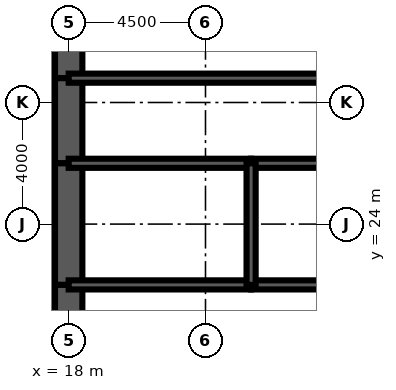
"""IFC4 building model, lengths in metres.
Left out: names, types, materials, properties, quantities, classifications, styles, units other than length and angle.
Written with IfcOpenShell. Run it as: python <this file> out.ifc"""

import sys

from ifc_helpers import new_model, si_unit, direction, frame, frame_2d, origin, place, context, subcontext, project, spatial, rectangle, extrude, element, fill, save


model = new_model("IFC4")
c1 = context("Model", 3, precision=1e-05, world=origin(), true_north=direction((0.0, 1.0)))
c2 = subcontext(c1, "Body", "Model", "MODEL_VIEW")
j1 = project(units=[si_unit("LENGTHUNIT", "METRE"), si_unit("PLANEANGLEUNIT", "RADIAN")], contexts=[c1])
p1 = place(None, origin())
s1 = spatial("IfcSite", under=j1, at=p1, CompositionType="ELEMENT")
p2 = place(p1, origin())
s2 = spatial("IfcBuilding", under=s1, at=p2, CompositionType="ELEMENT")
p3 = place(p2, frame((0.0, 0.0, 176.1)))
s3 = spatial("IfcBuildingStorey", under=s2, at=p3, CompositionType="ELEMENT", Elevation=176.1)
p4 = place(p3, frame((18.0, 32.0, 0.0), z_axis=(0.0, 0.0, 1.0), x_axis=(0.0, -1.0, 0.0)))
e1 = element("IfcWall", 1, at=p4, inside=s3, PredefinedType="SHEAR", context=c2, shape_type="SweptSolid", body=[
    extrude(rectangle(XDim=3.2, YDim=0.9, at=frame_2d((1.6, 0.0))), origin(), (0.0, 0.0, 1.0), 4.2),
])
p5 = place(p3, frame((18.0, 28.8, 0.0), z_axis=(0.0, 0.0, 1.0), x_axis=(0.0, -1.0, 0.0)))
e2 = element("IfcWall", 2, at=p5, inside=s3, PredefinedType="SHEAR", context=c2, shape_type="SweptSolid", body=[
    extrude(rectangle(XDim=2.8, YDim=0.9, at=frame_2d((1.4, 0.0))), origin(), (0.0, 0.0, 1.0), 4.2),
])
p6 = place(p5, frame((0.4, 0.0, 0.0)))
e3 = element("IfcOpeningElement", 3, at=p6, cuts=e2, PredefinedType="OPENING", context=c2, shape_type="SweptSolid", body=[
    extrude(rectangle(XDim=1.8, YDim=2.1, at=frame_2d((0.9, 1.05))), frame((0.0, 0.46, 0.0), z_axis=(0.0, -1.0, 0.0), x_axis=(1.0, 0.0, 0.0)), (0.0, 0.0, 1.0), 0.92),
])
p7 = place(p3, frame((18.0, 26.0, 0.0), z_axis=(0.0, 0.0, 1.0), x_axis=(0.0, -1.0, 0.0)))
e4 = element("IfcWall", 4, at=p7, inside=s3, PredefinedType="SHEAR", context=c2, shape_type="SweptSolid", body=[
    extrude(rectangle(XDim=4.0, YDim=0.9, at=frame_2d((2.0, 0.0))), origin(), (0.0, 0.0, 1.0), 4.2),
])
p8 = place(p3, frame((18.0, 22.0, 0.0), z_axis=(0.0, 0.0, 1.0), x_axis=(0.0, -1.0, 0.0)))
e5 = element("IfcWall", 5, at=p8, inside=s3, PredefinedType="SHEAR", context=c2, shape_type="SweptSolid", body=[
    extrude(rectangle(XDim=2.8, YDim=0.9, at=frame_2d((1.4, 0.0))), origin(), (0.0, 0.0, 1.0), 4.2),
])
p9 = place(p8, frame((0.6, 0.0, 0.0)))
e6 = element("IfcOpeningElement", 6, at=p9, cuts=e5, PredefinedType="OPENING", context=c2, shape_type="SweptSolid", body=[
    extrude(rectangle(XDim=1.8, YDim=2.1, at=frame_2d((0.9, 1.05))), frame((0.0, 0.46, 0.0), z_axis=(0.0, -1.0, 0.0), x_axis=(1.0, 0.0, 0.0)), (0.0, 0.0, 1.0), 0.92),
])
p10 = place(p3, frame((18.0, 28.8, 0.0), z_axis=(0.0, 0.0, 1.0), x_axis=(1.0, 0.0, 0.0)))
e7 = element("IfcWall", 7, at=p10, inside=s3, PredefinedType="SOLIDWALL", context=c2, shape_type="SweptSolid", body=[
    extrude(rectangle(XDim=9.0, YDim=0.3, at=frame_2d((4.5, 0.0))), origin(), (0.0, 0.0, 1.0), 4.2),
])
p11 = place(p10, frame((0.65, 0.0, 0.0)))
e8 = element("IfcOpeningElement", 8, at=p11, cuts=e7, PredefinedType="OPENING", context=c2, shape_type="SweptSolid", body=[
    extrude(rectangle(XDim=1.0, YDim=2.1, at=frame_2d((0.5, 1.05))), frame((0.0, 0.16, 0.0), z_axis=(0.0, -1.0, 0.0), x_axis=(1.0, 0.0, 0.0)), (0.0, 0.0, 1.0), 0.32),
])
p12 = place(p3, frame((18.0, 22.0, 0.0), z_axis=(0.0, 0.0, 1.0), x_axis=(1.0, 0.0, 0.0)))
e9 = element("IfcWall", 9, at=p12, inside=s3, PredefinedType="SOLIDWALL", context=c2, shape_type="SweptSolid", body=[
    extrude(rectangle(XDim=6.0, YDim=0.3, at=frame_2d((3.0, 0.0))), origin(), (0.0, 0.0, 1.0), 4.2),
])
p13 = place(p12, frame((4.4, 0.0, 0.0)))
e10 = element("IfcOpeningElement", 10, at=p13, cuts=e9, PredefinedType="OPENING", context=c2, shape_type="SweptSolid", body=[
    extrude(rectangle(XDim=1.0, YDim=2.1, at=frame_2d((0.5, 1.05))), frame((0.0, 0.16, 0.0), z_axis=(0.0, -1.0, 0.0), x_axis=(1.0, 0.0, 0.0)), (0.0, 0.0, 1.0), 0.32),
])
p14 = place(p12, frame((0.85, 0.0, 0.0)))
e11 = element("IfcOpeningElement", 11, at=p14, cuts=e9, PredefinedType="OPENING", context=c2, shape_type="SweptSolid", body=[
    extrude(rectangle(XDim=1.0, YDim=2.1, at=frame_2d((0.5, 1.05))), frame((0.0, 0.16, 0.0), z_axis=(0.0, -1.0, 0.0), x_axis=(1.0, 0.0, 0.0)), (0.0, 0.0, 1.0), 0.32),
])
p15 = place(p3, frame((24.0, 22.0, 0.0), z_axis=(0.0, 0.0, 1.0), x_axis=(1.0, 0.0, 0.0)))
e12 = element("IfcWall", 12, at=p15, inside=s3, PredefinedType="SOLIDWALL", context=c2, shape_type="SweptSolid", body=[
    extrude(rectangle(XDim=3.0, YDim=0.3, at=frame_2d((1.5, 0.0))), origin(), (0.0, 0.0, 1.0), 4.2),
])
p16 = place(p15, frame((1.0, 0.0, 0.0)))
e13 = element("IfcOpeningElement", 13, at=p16, cuts=e12, PredefinedType="OPENING", context=c2, shape_type="SweptSolid", body=[
    extrude(rectangle(XDim=1.0, YDim=2.1, at=frame_2d((0.5, 1.05))), frame((0.0, 0.16, 0.0), z_axis=(0.0, -1.0, 0.0), x_axis=(1.0, 0.0, 0.0)), (0.0, 0.0, 1.0), 0.32),
])
p17 = place(p3, frame((18.0, 26.0, 0.0), z_axis=(0.0, 0.0, 1.0), x_axis=(1.0, 0.0, 0.0)))
e14 = element("IfcWall", 14, at=p17, inside=s3, PredefinedType="SOLIDWALL", context=c2, shape_type="SweptSolid", body=[
    extrude(rectangle(XDim=6.0, YDim=0.3, at=frame_2d((3.0, 0.0))), origin(), (0.0, 0.0, 1.0), 4.2),
])
p18 = place(p3, frame((24.0, 26.0, 0.0), z_axis=(0.0, 0.0, 1.0), x_axis=(1.0, 0.0, 0.0)))
e15 = element("IfcWall", 15, at=p18, inside=s3, PredefinedType="SOLIDWALL", context=c2, shape_type="SweptSolid", body=[
    extrude(rectangle(XDim=3.0, YDim=0.3, at=frame_2d((1.5, 0.0))), origin(), (0.0, 0.0, 1.0), 4.2),
])
p19 = place(p3, frame((24.0, 22.0, 0.0), z_axis=(0.0, 0.0, 1.0), x_axis=(0.0, 1.0, 0.0)))
e16 = element("IfcWall", 16, at=p19, inside=s3, PredefinedType="SOLIDWALL", context=c2, shape_type="SweptSolid", body=[
    extrude(rectangle(XDim=4.0, YDim=0.3, at=frame_2d((2.0, 0.0))), origin(), (0.0, 0.0, 1.0), 4.2),
])
p20 = place(p3, frame((20.325, 22.15, 0.0), z_axis=(0.0, 0.0, 1.0), x_axis=(0.0, 1.0, 0.0)))
e17 = element("IfcWall", 17, at=p20, inside=s3, PredefinedType="PARTITIONING", context=c2, shape_type="SweptSolid", body=[
    extrude(rectangle(XDim=3.7, YDim=0.15, at=frame_2d((1.85, 0.0))), origin(), (0.0, 0.0, 1.0), 3.0),
])
p21 = place(p3, frame((25.2, 26.15, 0.0), z_axis=(0.0, 0.0, 1.0), x_axis=(0.0, 1.0, 0.0)))
e18 = element("IfcWall", 18, at=p21, inside=s3, PredefinedType="PARTITIONING", context=c2, shape_type="SweptSolid", body=[
    extrude(rectangle(XDim=2.5, YDim=0.15, at=frame_2d((1.25, 0.0))), origin(), (0.0, 0.0, 1.0), 3.0),
])
p22 = place(p21, frame((0.35, 0.0, 0.0)))
e19 = element("IfcOpeningElement", 19, at=p22, cuts=e18, PredefinedType="OPENING", context=c2, shape_type="SweptSolid", body=[
    extrude(rectangle(XDim=1.0, YDim=2.1, at=frame_2d((0.5, 1.05))), frame((0.0, 0.085, 0.0), z_axis=(0.0, -1.0, 0.0), x_axis=(1.0, 0.0, 0.0)), (0.0, 0.0, 1.0), 0.17),
])
p23 = place(p22, origin())
e20 = element("IfcDoor", 20, at=p23, inside=s3, OperationType="SINGLE_SWING_LEFT", PredefinedType="DOOR", context=c2, shape_type="SweptSolid", body=[
    extrude(rectangle(XDim=1.0, YDim=2.1, at=frame_2d((0.5, 1.05))), frame((0.0, 0.025, 0.0), z_axis=(0.0, -1.0, 0.0), x_axis=(1.0, 0.0, 0.0)), (0.0, 0.0, 1.0), 0.05),
])
fill(e19, e20)
p24 = place(p11, origin())
e21 = element("IfcDoor", 21, at=p24, inside=s3, OperationType="SINGLE_SWING_LEFT", PredefinedType="DOOR", context=c2, shape_type="SweptSolid", body=[
    extrude(rectangle(XDim=1.0, YDim=2.1, at=frame_2d((0.5, 1.05))), frame((0.0, 0.025, 0.0), z_axis=(0.0, -1.0, 0.0), x_axis=(1.0, 0.0, 0.0)), (0.0, 0.0, 1.0), 0.05),
])
fill(e8, e21)
p25 = place(p9, origin())
e22 = element("IfcDoor", 22, at=p25, inside=s3, OperationType="SINGLE_SWING_LEFT", PredefinedType="DOOR", context=c2, shape_type="SweptSolid", body=[
    extrude(rectangle(XDim=1.8, YDim=2.1, at=frame_2d((0.9, 1.05))), frame((0.0, 0.45, 0.0), z_axis=(0.0, -1.0, 0.0), x_axis=(1.0, 0.0, 0.0)), (0.0, 0.0, 1.0), 0.899),
])
fill(e6, e22)
p26 = place(p6, origin())
e23 = element("IfcDoor", 23, at=p26, inside=s3, OperationType="SINGLE_SWING_LEFT", PredefinedType="DOOR", context=c2, shape_type="SweptSolid", body=[
    extrude(rectangle(XDim=1.8, YDim=2.1, at=frame_2d((0.9, 1.05))), frame((0.0, 0.45, 0.0), z_axis=(0.0, -1.0, 0.0), x_axis=(1.0, 0.0, 0.0)), (0.0, 0.0, 1.0), 0.899),
])
fill(e3, e23)
p27 = place(p13, origin())
e24 = element("IfcDoor", 24, at=p27, inside=s3, OperationType="SINGLE_SWING_RIGHT", PredefinedType="DOOR", context=c2, shape_type="SweptSolid", body=[
    extrude(rectangle(XDim=1.0, YDim=2.1, at=frame_2d((0.5, 1.05))), frame((0.0, 0.025, 0.0), z_axis=(0.0, -1.0, 0.0), x_axis=(1.0, 0.0, 0.0)), (0.0, 0.0, 1.0), 0.05),
])
fill(e10, e24)
p28 = place(p16, origin())
e25 = element("IfcDoor", 25, at=p28, inside=s3, OperationType="SINGLE_SWING_LEFT", PredefinedType="DOOR", context=c2, shape_type="SweptSolid", body=[
    extrude(rectangle(XDim=1.0, YDim=2.1, at=frame_2d((0.5, 1.05))), frame((0.0, 0.025, 0.0), z_axis=(0.0, -1.0, 0.0), x_axis=(1.0, 0.0, 0.0)), (0.0, 0.0, 1.0), 0.05),
])
fill(e13, e25)
p29 = place(p14, origin())
e26 = element("IfcDoor", 26, at=p29, inside=s3, OperationType="SINGLE_SWING_LEFT", PredefinedType="DOOR", context=c2, shape_type="SweptSolid", body=[
    extrude(rectangle(XDim=1.0, YDim=2.1, at=frame_2d((0.5, 1.05))), frame((0.0, 0.025, 0.0), z_axis=(0.0, -1.0, 0.0), x_axis=(1.0, 0.0, 0.0)), (0.0, 0.0, 1.0), 0.05),
])
fill(e11, e26)
save(model, sys.argv[1])
